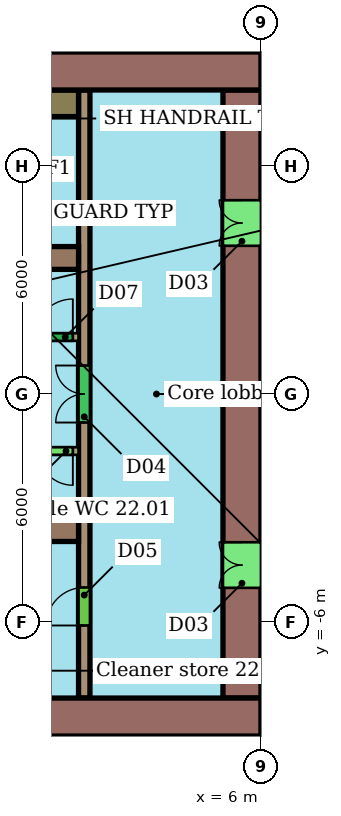
"""IFC4 building model, lengths in metres.
Left out: names, types, materials, properties, quantities, classifications, styles, units other than length and angle.
Written with IfcOpenShell. Run it as: python <this file> out.ifc"""

import sys

from ifc_helpers import new_model, si_unit, direction, frame, frame_2d, origin, place, context, subcontext, project, spatial, rectangle, extrude, element, fill, save


model = new_model("IFC4")
c1 = context("Model", 3, precision=1e-05, world=origin(), true_north=direction((0.0, 1.0)))
c2 = subcontext(c1, "Body", "Model", "MODEL_VIEW")
j1 = project(units=[si_unit("LENGTHUNIT", "METRE"), si_unit("PLANEANGLEUNIT", "RADIAN")], contexts=[c1])
p1 = place(None, origin())
s1 = spatial("IfcSite", under=j1, at=p1, CompositionType="ELEMENT")
p2 = place(p1, origin())
s2 = spatial("IfcBuilding", under=s1, at=p2, CompositionType="ELEMENT")
p3 = place(p2, frame((0.0, 0.0, 99.4)))
s3 = spatial("IfcBuildingStorey", under=s2, at=p3, CompositionType="ELEMENT", Elevation=99.4)
p4 = place(p3, frame((6.0, 8.5, 0.0), z_axis=(0.0, 0.0, 1.0), x_axis=(-1.0, 0.0, 0.0)))
e1 = element("IfcWall", 1, at=p4, inside=s3, PredefinedType="SHEAR", context=c2, shape_type="SweptSolid", body=[
    extrude(rectangle(XDim=12.0, YDim=1.0, at=frame_2d((6.0, 0.0))), origin(), (0.0, 0.0, 1.0), 3.3),
])
p5 = place(p4, frame((5.6, 0.0, 0.0)))
e2 = element("IfcOpeningElement", 2, at=p5, cuts=e1, PredefinedType="OPENING", context=c2, shape_type="SweptSolid", body=[
    extrude(rectangle(XDim=1.2, YDim=2.1, at=frame_2d((0.6, 1.05))), frame((0.0, 0.51, 0.0), z_axis=(0.0, -1.0, 0.0), x_axis=(1.0, 0.0, 0.0)), (0.0, 0.0, 1.0), 1.02),
])
p6 = place(p3, frame((-18.0, -8.5, 0.0), z_axis=(0.0, 0.0, 1.0), x_axis=(1.0, 0.0, 0.0)))
e3 = element("IfcWall", 3, at=p6, inside=s3, PredefinedType="SHEAR", context=c2, shape_type="SweptSolid", body=[
    extrude(rectangle(XDim=24.0, YDim=1.0, at=frame_2d((12.0, 0.0))), origin(), (0.0, 0.0, 1.0), 3.3),
])
p7 = place(p6, frame((6.0, 0.0, 0.0)))
e4 = element("IfcOpeningElement", 4, at=p7, cuts=e3, PredefinedType="OPENING", context=c2, shape_type="SweptSolid", body=[
    extrude(rectangle(XDim=1.2, YDim=2.1, at=frame_2d((0.6, 1.05))), frame((0.0, 0.51, 0.0), z_axis=(0.0, -1.0, 0.0), x_axis=(1.0, 0.0, 0.0)), (0.0, 0.0, 1.0), 1.02),
])
p8 = place(p3, frame((5.5, -8.0, 0.0), z_axis=(0.0, 0.0, 1.0), x_axis=(0.0, 1.0, 0.0)))
e5 = element("IfcWall", 5, at=p8, inside=s3, PredefinedType="SHEAR", context=c2, shape_type="SweptSolid", body=[
    extrude(rectangle(XDim=16.0, YDim=1.0, at=frame_2d((8.0, 0.0))), origin(), (0.0, 0.0, 1.0), 3.3),
])
p9 = place(p8, frame((2.9, 0.0, 0.0)))
e6 = element("IfcOpeningElement", 6, at=p9, cuts=e5, PredefinedType="OPENING", context=c2, shape_type="SweptSolid", body=[
    extrude(rectangle(XDim=1.2, YDim=2.1, at=frame_2d((0.6, 1.05))), frame((0.0, 0.51, 0.0), z_axis=(0.0, -1.0, 0.0), x_axis=(1.0, 0.0, 0.0)), (0.0, 0.0, 1.0), 1.02),
])
p10 = place(p8, frame((11.9, 0.0, 0.0)))
e7 = element("IfcOpeningElement", 7, at=p10, cuts=e5, PredefinedType="OPENING", context=c2, shape_type="SweptSolid", body=[
    extrude(rectangle(XDim=1.2, YDim=2.1, at=frame_2d((0.6, 1.05))), frame((0.0, 0.51, 0.0), z_axis=(0.0, -1.0, 0.0), x_axis=(1.0, 0.0, 0.0)), (0.0, 0.0, 1.0), 1.02),
])
for number, where, z_axis, x_axis in (
    (8, (-6.0, 3.58, 0.0), (0.0, 0.0, 1.0), (1.0, 0.0, 0.0)),
    (9, (-6.0, -3.58, 0.0), (0.0, 0.0, 1.0), (1.0, 0.0, 0.0)),
):
    element("IfcWall", number, at=place(p3, frame(where, z_axis=z_axis, x_axis=x_axis)), inside=s3, PredefinedType="SHEAR", context=c2, shape_type="SweptSolid", body=[
        extrude(rectangle(XDim=7.2, YDim=0.6, at=frame_2d((3.6, 0.0))), origin(), (0.0, 0.0, 1.0), 3.3),
    ])
p11 = place(p3, frame((1.35, -8.0, 0.0), z_axis=(0.0, 0.0, 1.0), x_axis=(0.0, 1.0, 0.0)))
e10 = element("IfcWall", 10, at=p11, inside=s3, PredefinedType="SHEAR", context=c2, shape_type="SweptSolid", body=[
    extrude(rectangle(XDim=16.0, YDim=0.3, at=frame_2d((8.0, 0.0))), origin(), (0.0, 0.0, 1.0), 3.3),
])
p12 = place(p11, frame((1.91, 0.0, 0.0)))
e11 = element("IfcOpeningElement", 11, at=p12, cuts=e10, PredefinedType="OPENING", context=c2, shape_type="SweptSolid", body=[
    extrude(rectangle(XDim=1.0, YDim=2.1, at=frame_2d((0.5, 1.05))), frame((0.0, 0.16, 0.0), z_axis=(0.0, -1.0, 0.0), x_axis=(1.0, 0.0, 0.0)), (0.0, 0.0, 1.0), 0.32),
])
p13 = place(p11, frame((7.25, 0.0, 0.0)))
e12 = element("IfcOpeningElement", 12, at=p13, cuts=e10, PredefinedType="OPENING", context=c2, shape_type="SweptSolid", body=[
    extrude(rectangle(XDim=1.5, YDim=2.1, at=frame_2d((0.75, 1.05))), frame((0.0, 0.16, 0.0), z_axis=(0.0, -1.0, 0.0), x_axis=(1.0, 0.0, 0.0)), (0.0, 0.0, 1.0), 0.32),
])
p14 = place(p3, frame((-13.2, 1.5, 0.0), z_axis=(0.0, 0.0, 1.0), x_axis=(1.0, 0.0, 0.0)))
e13 = element("IfcWall", 13, at=p14, inside=s3, PredefinedType="SHEAR", context=c2, shape_type="SweptSolid", body=[
    extrude(rectangle(XDim=14.4, YDim=0.2, at=frame_2d((7.2, 0.0))), origin(), (0.0, 0.0, 1.0), 3.3),
])
p15 = place(p14, frame((0.546, 0.0, 0.0)))
e14 = element("IfcOpeningElement", 14, at=p15, cuts=e13, PredefinedType="OPENING", context=c2, shape_type="SweptSolid", body=[
    extrude(rectangle(XDim=1.1, YDim=2.1, at=frame_2d((0.55, 1.05))), frame((0.0, 0.11, 0.0), z_axis=(0.0, -1.0, 0.0), x_axis=(1.0, 0.0, 0.0)), (0.0, 0.0, 1.0), 0.22),
])
p16 = place(p14, frame((2.988, 0.0, 0.0)))
e15 = element("IfcOpeningElement", 15, at=p16, cuts=e13, PredefinedType="OPENING", context=c2, shape_type="SweptSolid", body=[
    extrude(rectangle(XDim=1.1, YDim=2.1, at=frame_2d((0.55, 1.05))), frame((0.0, 0.11, 0.0), z_axis=(0.0, -1.0, 0.0), x_axis=(1.0, 0.0, 0.0)), (0.0, 0.0, 1.0), 0.22),
])
p17 = place(p14, frame((5.429, 0.0, 0.0)))
e16 = element("IfcOpeningElement", 16, at=p17, cuts=e13, PredefinedType="OPENING", context=c2, shape_type="SweptSolid", body=[
    extrude(rectangle(XDim=1.1, YDim=2.1, at=frame_2d((0.55, 1.05))), frame((0.0, 0.11, 0.0), z_axis=(0.0, -1.0, 0.0), x_axis=(1.0, 0.0, 0.0)), (0.0, 0.0, 1.0), 0.22),
])
p18 = place(p14, frame((7.871, 0.0, 0.0)))
e17 = element("IfcOpeningElement", 17, at=p18, cuts=e13, PredefinedType="OPENING", context=c2, shape_type="SweptSolid", body=[
    extrude(rectangle(XDim=1.1, YDim=2.1, at=frame_2d((0.55, 1.05))), frame((0.0, 0.11, 0.0), z_axis=(0.0, -1.0, 0.0), x_axis=(1.0, 0.0, 0.0)), (0.0, 0.0, 1.0), 0.22),
])
p19 = place(p14, frame((11.607, 0.0, 0.0)))
e18 = element("IfcOpeningElement", 18, at=p19, cuts=e13, PredefinedType="OPENING", context=c2, shape_type="SweptSolid", body=[
    extrude(rectangle(XDim=0.9, YDim=2.1, at=frame_2d((0.45, 1.05))), frame((0.0, 0.11, 0.0), z_axis=(0.0, -1.0, 0.0), x_axis=(1.0, 0.0, 0.0)), (0.0, 0.0, 1.0), 0.22),
])
p20 = place(p14, frame((13.25, 0.0, 0.0)))
e19 = element("IfcOpeningElement", 19, at=p20, cuts=e13, PredefinedType="OPENING", context=c2, shape_type="SweptSolid", body=[
    extrude(rectangle(XDim=1.0, YDim=2.1, at=frame_2d((0.5, 1.05))), frame((0.0, 0.11, 0.0), z_axis=(0.0, -1.0, 0.0), x_axis=(1.0, 0.0, 0.0)), (0.0, 0.0, 1.0), 0.22),
])
p21 = place(p3, frame((1.2, -1.5, 0.0), z_axis=(0.0, 0.0, 1.0), x_axis=(-1.0, 0.0, 0.0)))
e20 = element("IfcWall", 20, at=p21, inside=s3, PredefinedType="SHEAR", context=c2, shape_type="SweptSolid", body=[
    extrude(rectangle(XDim=14.4, YDim=0.2, at=frame_2d((7.2, 0.0))), origin(), (0.0, 0.0, 1.0), 3.3),
])
p22 = place(p21, frame((7.821, 0.0, 0.0)))
e21 = element("IfcOpeningElement", 21, at=p22, cuts=e20, PredefinedType="OPENING", context=c2, shape_type="SweptSolid", body=[
    extrude(rectangle(XDim=1.2, YDim=2.1, at=frame_2d((0.6, 1.05))), frame((0.0, 0.11, 0.0), z_axis=(0.0, -1.0, 0.0), x_axis=(1.0, 0.0, 0.0)), (0.0, 0.0, 1.0), 0.22),
])
p23 = place(p21, frame((0.15, 0.0, 0.0)))
e22 = element("IfcOpeningElement", 22, at=p23, cuts=e20, PredefinedType="OPENING", context=c2, shape_type="SweptSolid", body=[
    extrude(rectangle(XDim=0.9, YDim=2.1, at=frame_2d((0.45, 1.05))), frame((0.0, 0.11, 0.0), z_axis=(0.0, -1.0, 0.0), x_axis=(1.0, 0.0, 0.0)), (0.0, 0.0, 1.0), 0.22),
])
p24 = place(p3, frame((0.4, 7.65, 0.0), z_axis=(0.0, 0.0, 1.0), x_axis=(1.0, 0.0, 0.0)))
e23 = element("IfcWall", 23, at=p24, inside=s3, PredefinedType="SHEAR", context=c2, shape_type="SweptSolid", body=[
    extrude(rectangle(XDim=0.8, YDim=0.7, at=frame_2d((0.4, 0.0))), origin(), (0.0, 0.0, 1.0), 3.3),
])
p25 = place(p9, origin())
e24 = element("IfcDoor", 24, at=p25, inside=s3, OperationType="DOUBLE_DOOR_SINGLE_SWING", PredefinedType="NOTDEFINED", context=c2, shape_type="SweptSolid", body=[
    extrude(rectangle(XDim=1.2, YDim=2.1, at=frame_2d((0.6, 1.05))), frame((0.0, 0.025, 0.0), z_axis=(0.0, -1.0, 0.0), x_axis=(1.0, 0.0, 0.0)), (0.0, 0.0, 1.0), 0.05),
])
fill(e6, e24)
p26 = place(p10, origin())
e25 = element("IfcDoor", 25, at=p26, inside=s3, OperationType="DOUBLE_DOOR_SINGLE_SWING", PredefinedType="NOTDEFINED", context=c2, shape_type="SweptSolid", body=[
    extrude(rectangle(XDim=1.2, YDim=2.1, at=frame_2d((0.6, 1.05))), frame((0.0, 0.025, 0.0), z_axis=(0.0, -1.0, 0.0), x_axis=(1.0, 0.0, 0.0)), (0.0, 0.0, 1.0), 0.05),
])
fill(e7, e25)
p27 = place(p12, origin())
e26 = element("IfcDoor", 26, at=p27, inside=s3, OperationType="SINGLE_SWING_LEFT", PredefinedType="NOTDEFINED", context=c2, shape_type="SweptSolid", body=[
    extrude(rectangle(XDim=1.0, YDim=2.1, at=frame_2d((0.5, 1.05))), frame((0.0, 0.025, 0.0), z_axis=(0.0, -1.0, 0.0), x_axis=(1.0, 0.0, 0.0)), (0.0, 0.0, 1.0), 0.05),
])
fill(e11, e26)
p28 = place(p13, origin())
e27 = element("IfcDoor", 27, at=p28, inside=s3, OperationType="DOUBLE_DOOR_SINGLE_SWING", PredefinedType="NOTDEFINED", context=c2, shape_type="SweptSolid", body=[
    extrude(rectangle(XDim=1.5, YDim=2.1, at=frame_2d((0.75, 1.05))), frame((0.0, 0.025, 0.0), z_axis=(0.0, -1.0, 0.0), x_axis=(1.0, 0.0, 0.0)), (0.0, 0.0, 1.0), 0.05),
])
fill(e12, e27)
p29 = place(p20, origin())
e28 = element("IfcDoor", 28, at=p29, inside=s3, OperationType="SINGLE_SWING_RIGHT", PredefinedType="NOTDEFINED", context=c2, shape_type="SweptSolid", body=[
    extrude(rectangle(XDim=1.0, YDim=2.1, at=frame_2d((0.5, 1.05))), frame((0.0, 0.025, 0.0), z_axis=(0.0, -1.0, 0.0), x_axis=(1.0, 0.0, 0.0)), (0.0, 0.0, 1.0), 0.05),
])
fill(e19, e28)
p30 = place(p23, origin())
e29 = element("IfcDoor", 29, at=p30, inside=s3, OperationType="SINGLE_SWING_LEFT", PredefinedType="NOTDEFINED", context=c2, shape_type="SweptSolid", body=[
    extrude(rectangle(XDim=0.9, YDim=2.1, at=frame_2d((0.45, 1.05))), frame((0.0, 0.025, 0.0), z_axis=(0.0, -1.0, 0.0), x_axis=(1.0, 0.0, 0.0)), (0.0, 0.0, 1.0), 0.05),
])
fill(e22, e29)
save(model, sys.argv[1])
